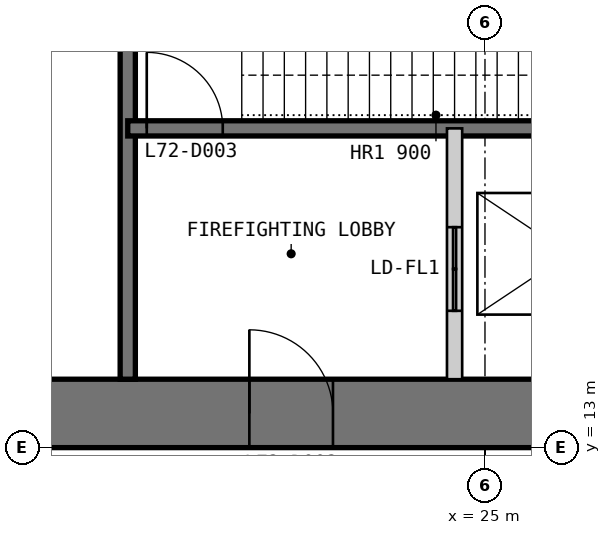
"""IFC4 building model, lengths in metres.
Left out: names, types, materials, properties, quantities, classifications, styles, units other than length and angle.
Written with IfcOpenShell. Run it as: python <this file> out.ifc"""

import sys

from ifc_helpers import new_model, si_unit, direction, frame, frame_2d, origin, place, context, subcontext, project, spatial, polyline, rectangle, outline, extrude, element, fill, save


model = new_model("IFC4")
c1 = context("Model", 3, precision=1e-05, world=origin(), true_north=direction((0.0, 1.0)))
c2 = subcontext(c1, "Body", "Model", "MODEL_VIEW")
j1 = project(units=[si_unit("LENGTHUNIT", "METRE"), si_unit("PLANEANGLEUNIT", "RADIAN")], contexts=[c1])
p1 = place(None, origin())
s1 = spatial("IfcSite", under=j1, at=p1, CompositionType="ELEMENT")
p2 = place(p1, origin())
s2 = spatial("IfcBuilding", under=s1, at=p2, CompositionType="ELEMENT")
p3 = place(p2, frame((0.0, 0.0, 296.8)))
s3 = spatial("IfcBuildingStorey", under=s2, at=p3, CompositionType="ELEMENT", Elevation=296.8)
p4 = place(p3, frame((13.0, 13.45, 0.0), z_axis=(0.0, 0.0, 1.0), x_axis=(1.0, 0.0, 0.0)))
e1 = element("IfcWall", 1, at=p4, inside=s3, PredefinedType="SHEAR", context=c2, shape_type="SweptSolid", body=[
    extrude(outline(polyline([(0.0, -0.45), (24.0, -0.45), (23.1, 0.45), (0.9, 0.45), (0.0, -0.45)])), origin(), (0.0, 0.0, 1.0), 5.0),
])
p5 = place(p4, frame((4.9, 0.0, 0.0)))
e2 = element("IfcOpeningElement", 2, at=p5, cuts=e1, PredefinedType="OPENING", context=c2, shape_type="SweptSolid", body=[
    extrude(rectangle(XDim=1.0, YDim=2.2, at=frame_2d((0.5, 1.1))), frame((0.0, 0.46, 0.0), z_axis=(0.0, -1.0, 0.0), x_axis=(1.0, 0.0, 0.0)), (0.0, 0.0, 1.0), 0.92),
])
p6 = place(p4, frame((8.9, 0.0, 0.0)))
e3 = element("IfcOpeningElement", 3, at=p6, cuts=e1, PredefinedType="OPENING", context=c2, shape_type="SweptSolid", body=[
    extrude(rectangle(XDim=1.1, YDim=2.2, at=frame_2d((0.55, 1.1))), frame((0.0, 0.46, 0.0), z_axis=(0.0, -1.0, 0.0), x_axis=(1.0, 0.0, 0.0)), (0.0, 0.0, 1.0), 0.92),
])
p7 = place(p4, frame((15.05, 0.0, 0.0)))
e4 = element("IfcOpeningElement", 4, at=p7, cuts=e1, PredefinedType="OPENING", context=c2, shape_type="SweptSolid", body=[
    extrude(rectangle(XDim=0.9, YDim=2.2, at=frame_2d((0.45, 1.1))), frame((0.0, 0.46, 0.0), z_axis=(0.0, -1.0, 0.0), x_axis=(1.0, 0.0, 0.0)), (0.0, 0.0, 1.0), 0.92),
])
p8 = place(p4, frame((17.9, 0.0, 0.0)))
e5 = element("IfcOpeningElement", 5, at=p8, cuts=e1, PredefinedType="OPENING", context=c2, shape_type="SweptSolid", body=[
    extrude(rectangle(XDim=1.0, YDim=2.2, at=frame_2d((0.5, 1.1))), frame((0.0, 0.46, 0.0), z_axis=(0.0, -1.0, 0.0), x_axis=(1.0, 0.0, 0.0)), (0.0, 0.0, 1.0), 0.92),
])
p9 = place(p4, frame((21.4, 0.0, 0.0)))
e6 = element("IfcOpeningElement", 6, at=p9, cuts=e1, PredefinedType="OPENING", context=c2, shape_type="SweptSolid", body=[
    extrude(rectangle(XDim=1.0, YDim=2.2, at=frame_2d((0.5, 1.1))), frame((0.0, 0.46, 0.0), z_axis=(0.0, -1.0, 0.0), x_axis=(1.0, 0.0, 0.0)), (0.0, 0.0, 1.0), 0.92),
])
p10 = place(p3, frame((20.3, 13.9, 0.0), z_axis=(0.0, 0.0, 1.0), x_axis=(0.0, 1.0, 0.0)))
e7 = element("IfcWall", 7, at=p10, inside=s3, PredefinedType="SOLIDWALL", context=c2, shape_type="SweptSolid", body=[
    extrude(rectangle(XDim=16.1, YDim=0.2, at=frame_2d((8.05, 0.0))), origin(), (0.0, 0.0, 1.0), 4.8),
])
p11 = place(p10, frame((6.65, 0.0, 0.0)))
e8 = element("IfcOpeningElement", 8, at=p11, cuts=e7, PredefinedType="OPENING", context=c2, shape_type="SweptSolid", body=[
    extrude(rectangle(XDim=0.9, YDim=2.2, at=frame_2d((0.45, 1.1))), frame((0.0, 0.11, 0.0), z_axis=(0.0, -1.0, 0.0), x_axis=(1.0, 0.0, 0.0)), (0.0, 0.0, 1.0), 0.22),
])
p12 = place(p10, frame((9.15, 0.0, 0.0)))
e9 = element("IfcOpeningElement", 9, at=p12, cuts=e7, PredefinedType="OPENING", context=c2, shape_type="SweptSolid", body=[
    extrude(rectangle(XDim=0.9, YDim=2.2, at=frame_2d((0.45, 1.1))), frame((0.0, 0.11, 0.0), z_axis=(0.0, -1.0, 0.0), x_axis=(1.0, 0.0, 0.0)), (0.0, 0.0, 1.0), 0.22),
])
p13 = place(p10, frame((13.15, 0.0, 0.0)))
e10 = element("IfcOpeningElement", 10, at=p13, cuts=e7, PredefinedType="OPENING", context=c2, shape_type="SweptSolid", body=[
    extrude(rectangle(XDim=0.9, YDim=2.2, at=frame_2d((0.45, 1.1))), frame((0.0, 0.11, 0.0), z_axis=(0.0, -1.0, 0.0), x_axis=(1.0, 0.0, 0.0)), (0.0, 0.0, 1.0), 0.22),
])
p14 = place(p3, frame((20.3, 17.2, 0.0), z_axis=(0.0, 0.0, 1.0), x_axis=(1.0, 0.0, 0.0)))
e11 = element("IfcWall", 11, at=p14, inside=s3, PredefinedType="SOLIDWALL", context=c2, shape_type="SweptSolid", body=[
    extrude(rectangle(XDim=9.4, YDim=0.2, at=frame_2d((4.7, 0.0))), origin(), (0.0, 0.0, 1.0), 4.8),
])
p15 = place(p14, frame((0.25, 0.0, 0.0)))
e12 = element("IfcOpeningElement", 12, at=p15, cuts=e11, PredefinedType="OPENING", context=c2, shape_type="SweptSolid", body=[
    extrude(rectangle(XDim=1.0, YDim=2.2, at=frame_2d((0.5, 1.1))), frame((0.0, 0.11, 0.0), z_axis=(0.0, -1.0, 0.0), x_axis=(1.0, 0.0, 0.0)), (0.0, 0.0, 1.0), 0.22),
])
p16 = place(p3, frame((24.6, 13.9, 0.0), z_axis=(0.0, 0.0, 1.0), x_axis=(0.0, 1.0, 0.0)))
e13 = element("IfcWall", 13, at=p16, inside=s3, PredefinedType="PARTITIONING", context=c2, shape_type="SweptSolid", body=[
    extrude(rectangle(XDim=3.3, YDim=0.2, at=frame_2d((1.65, 0.0))), origin(), (0.0, 0.0, 1.0), 4.8),
])
p17 = place(p16, frame((0.9, 0.0, 0.0)))
e14 = element("IfcOpeningElement", 14, at=p17, cuts=e13, PredefinedType="OPENING", context=c2, shape_type="SweptSolid", body=[
    extrude(rectangle(XDim=1.1, YDim=2.2, at=frame_2d((0.55, 1.1))), frame((0.0, 0.11, 0.0), z_axis=(0.0, -1.0, 0.0), x_axis=(1.0, 0.0, 0.0)), (0.0, 0.0, 1.0), 0.22),
])
p18 = place(p6, origin())
e15 = element("IfcDoor", 15, at=p18, inside=s3, OperationType="SINGLE_SWING_LEFT", PredefinedType="DOOR", context=c2, shape_type="SweptSolid", body=[
    extrude(rectangle(XDim=1.1, YDim=2.2, at=frame_2d((0.55, 1.1))), frame((0.0, 0.025, 0.0), z_axis=(0.0, -1.0, 0.0), x_axis=(1.0, 0.0, 0.0)), (0.0, 0.0, 1.0), 0.05),
    extrude(outline(polyline([(0.0, 0.0), (0.04, 0.0), (0.04, 2.16), (1.06, 2.16), (1.06, 0.0), (1.1, 0.0), (1.1, 2.2), (0.0, 2.2), (0.0, 0.0)])), frame((0.0, 0.3, 0.0), z_axis=(0.0, -1.0, 0.0), x_axis=(1.0, 0.0, 0.0)), (0.0, 0.0, 1.0), 0.6),
])
fill(e3, e15)
p19 = place(p15, origin())
e16 = element("IfcDoor", 16, at=p19, inside=s3, OperationType="SINGLE_SWING_LEFT", PredefinedType="DOOR", context=c2, shape_type="SweptSolid", body=[
    extrude(rectangle(XDim=1.0, YDim=2.2, at=frame_2d((0.5, 1.1))), frame((0.0, 0.025, 0.0), z_axis=(0.0, -1.0, 0.0), x_axis=(1.0, 0.0, 0.0)), (0.0, 0.0, 1.0), 0.05),
])
fill(e12, e16)
p20 = place(p17, origin())
e17 = element("IfcDoor", 17, at=p20, inside=s3, OperationType="DOUBLE_DOOR_SLIDING", PredefinedType="DOOR", context=c2, shape_type="SweptSolid", body=[
    extrude(rectangle(XDim=1.1, YDim=2.2, at=frame_2d((0.55, 1.1))), frame((0.0, 0.025, 0.0), z_axis=(0.0, -1.0, 0.0), x_axis=(1.0, 0.0, 0.0)), (0.0, 0.0, 1.0), 0.05),
])
fill(e14, e17)
save(model, sys.argv[1])
